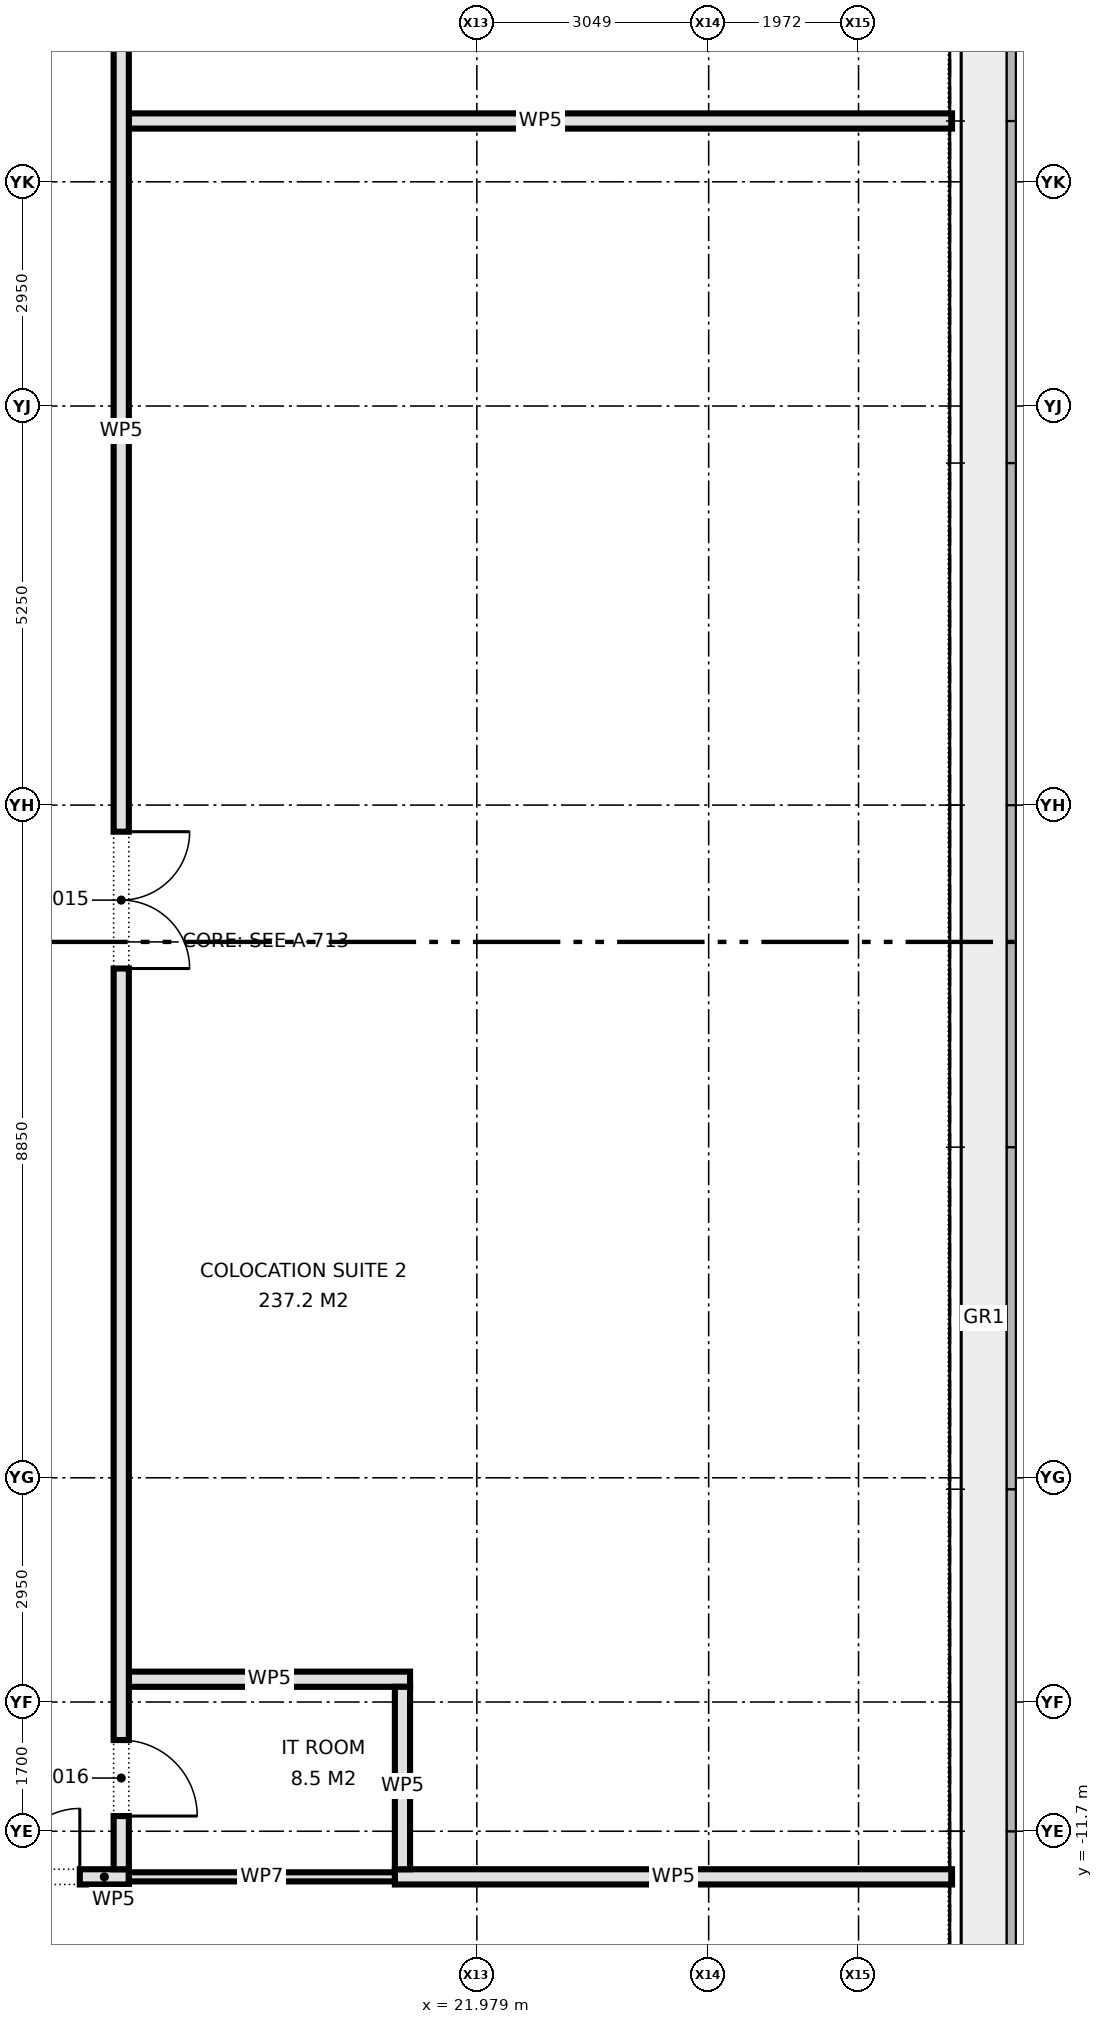
"""IFC4 building model, lengths in metres.
Left out: names, types, materials, properties, quantities, classifications, styles, units other than length and angle.
Written with IfcOpenShell. Run it as: python <this file> out.ifc"""

import sys

from ifc_helpers import new_model, si_unit, direction, frame, frame_2d, origin, place, context, subcontext, project, spatial, rectangle, extrude, element, fill, save


model = new_model("IFC4")
c1 = context("Model", 3, precision=1e-05, world=origin(), true_north=direction((0.0, 1.0)))
c2 = subcontext(c1, "Body", "Model", "MODEL_VIEW")
j1 = project(units=[si_unit("LENGTHUNIT", "METRE"), si_unit("PLANEANGLEUNIT", "RADIAN")], contexts=[c1])
p1 = place(None, origin())
s1 = spatial("IfcSite", under=j1, at=p1, CompositionType="ELEMENT")
p2 = place(p1, origin())
s2 = spatial("IfcBuilding", under=s1, at=p2, CompositionType="ELEMENT")
p3 = place(p2, frame((0.0, 0.0, 99.6)))
s3 = spatial("IfcBuildingStorey", under=s2, at=p3, CompositionType="ELEMENT", Elevation=99.6)
p4 = place(p3, frame((-20.33, -12.3, 0.0), z_axis=(0.0, 0.0, 1.0), x_axis=(1.0, 0.0, 0.0)))
e1 = element("IfcWall", 1, at=p4, inside=s3, PredefinedType="PARTITIONING", context=c2, shape_type="SweptSolid", body=[
    extrude(rectangle(XDim=37.73, YDim=0.2, at=frame_2d((18.865, 0.0))), origin(), (0.0, 0.0, 1.0), 4.2),
])
p5 = place(p4, frame((3.69, 0.0, 0.0)))
e2 = element("IfcOpeningElement", 2, at=p5, cuts=e1, PredefinedType="OPENING", context=c2, shape_type="SweptSolid", body=[
    extrude(rectangle(XDim=1.2, YDim=2.1, at=frame_2d((0.6, 1.05))), frame((0.0, 0.11, 0.0), z_axis=(0.0, -1.0, 0.0), x_axis=(1.0, 0.0, 0.0)), (0.0, 0.0, 1.0), 0.22),
])
p6 = place(p4, frame((12.13, 0.0, 0.0)))
e3 = element("IfcOpeningElement", 3, at=p6, cuts=e1, PredefinedType="OPENING", context=c2, shape_type="SweptSolid", body=[
    extrude(rectangle(XDim=1.8, YDim=2.1, at=frame_2d((0.9, 1.05))), frame((0.0, 0.11, 0.0), z_axis=(0.0, -1.0, 0.0), x_axis=(1.0, 0.0, 0.0)), (0.0, 0.0, 1.0), 0.22),
])
p7 = place(p4, frame((21.43, 0.0, 0.0)))
e4 = element("IfcOpeningElement", 4, at=p7, cuts=e1, PredefinedType="OPENING", context=c2, shape_type="SweptSolid", body=[
    extrude(rectangle(XDim=1.2, YDim=2.1, at=frame_2d((0.6, 1.05))), frame((0.0, 0.11, 0.0), z_axis=(0.0, -1.0, 0.0), x_axis=(1.0, 0.0, 0.0)), (0.0, 0.0, 1.0), 0.22),
])
p8 = place(p4, frame((35.285, 0.0, 0.0)))
e5 = element("IfcOpeningElement", 5, at=p8, cuts=e1, PredefinedType="OPENING", context=c2, shape_type="SweptSolid", body=[
    extrude(rectangle(XDim=1.8, YDim=2.1, at=frame_2d((0.9, 1.05))), frame((0.0, 0.11, 0.0), z_axis=(0.0, -1.0, 0.0), x_axis=(1.0, 0.0, 0.0)), (0.0, 0.0, 1.0), 0.22),
])
p9 = place(p4, frame((27.53, 0.0, 0.0)))
e6 = element("IfcOpeningElement", 6, at=p9, cuts=e1, PredefinedType="OPENING", context=c2, shape_type="SweptSolid", body=[
    extrude(rectangle(XDim=1.0, YDim=2.1, at=frame_2d((0.5, 1.05))), frame((0.0, 0.11, 0.0), z_axis=(0.0, -1.0, 0.0), x_axis=(1.0, 0.0, 0.0)), (0.0, 0.0, 1.0), 0.22),
])
p10 = place(p4, frame((30.53, 0.0, 0.0)))
e7 = element("IfcOpeningElement", 7, at=p10, cuts=e1, PredefinedType="OPENING", context=c2, shape_type="SweptSolid", body=[
    extrude(rectangle(XDim=1.0, YDim=2.1, at=frame_2d((0.5, 1.05))), frame((0.0, 0.11, 0.0), z_axis=(0.0, -1.0, 0.0), x_axis=(1.0, 0.0, 0.0)), (0.0, 0.0, 1.0), 0.22),
])
p11 = place(p4, frame((33.13, 0.0, 0.0)))
e8 = element("IfcOpeningElement", 8, at=p11, cuts=e1, PredefinedType="OPENING", context=c2, shape_type="SweptSolid", body=[
    extrude(rectangle(XDim=1.0, YDim=2.1, at=frame_2d((0.5, 1.05))), frame((0.0, 0.11, 0.0), z_axis=(0.0, -1.0, 0.0), x_axis=(1.0, 0.0, 0.0)), (0.0, 0.0, 1.0), 0.22),
])
p12 = place(p3, frame((20.9, -12.3, 0.0), z_axis=(0.0, 0.0, 1.0), x_axis=(1.0, 0.0, 0.0)))
e9 = element("IfcWall", 9, at=p12, inside=s3, PredefinedType="PARTITIONING", context=c2, shape_type="SweptSolid", body=[
    extrude(rectangle(XDim=7.33, YDim=0.2, at=frame_2d((3.665, 0.0))), origin(), (0.0, 0.0, 1.0), 4.2),
])
p13 = place(p3, frame((17.4, -9.7, 0.0), z_axis=(0.0, 0.0, 1.0), x_axis=(1.0, 0.0, 0.0)))
e10 = element("IfcWall", 10, at=p13, inside=s3, PredefinedType="PARTITIONING", context=c2, shape_type="SweptSolid", body=[
    extrude(rectangle(XDim=3.7, YDim=0.2, at=frame_2d((1.85, 0.0))), origin(), (0.0, 0.0, 1.0), 4.2),
])
p14 = place(p3, frame((17.4, 10.8, 0.0), z_axis=(0.0, 0.0, 1.0), x_axis=(1.0, 0.0, 0.0)))
e11 = element("IfcWall", 11, at=p14, inside=s3, PredefinedType="PARTITIONING", context=c2, shape_type="SweptSolid", body=[
    extrude(rectangle(XDim=10.83, YDim=0.2, at=frame_2d((5.415, 0.0))), origin(), (0.0, 0.0, 1.0), 4.2),
])
p15 = place(p3, frame((21.0, -12.2, 0.0), z_axis=(0.0, 0.0, 1.0), x_axis=(0.0, 1.0, 0.0)))
e12 = element("IfcWall", 12, at=p15, inside=s3, PredefinedType="PARTITIONING", context=c2, shape_type="SweptSolid", body=[
    extrude(rectangle(XDim=2.4, YDim=0.2, at=frame_2d((1.2, 0.0))), origin(), (0.0, 0.0, 1.0), 4.2),
])
p16 = place(p3, frame((17.3, -12.2, 0.0), z_axis=(0.0, 0.0, 1.0), x_axis=(0.0, 1.0, 0.0)))
e13 = element("IfcWall", 13, at=p16, inside=s3, PredefinedType="PARTITIONING", context=c2, shape_type="SweptSolid", body=[
    extrude(rectangle(XDim=24.4, YDim=0.2, at=frame_2d((12.2, 0.0))), origin(), (0.0, 0.0, 1.0), 4.2),
])
p17 = place(p16, frame((11.85, 0.0, 0.0)))
e14 = element("IfcOpeningElement", 14, at=p17, cuts=e13, PredefinedType="OPENING", context=c2, shape_type="SweptSolid", body=[
    extrude(rectangle(XDim=1.8, YDim=2.1, at=frame_2d((0.9, 1.05))), frame((0.0, 0.11, 0.0), z_axis=(0.0, -1.0, 0.0), x_axis=(1.0, 0.0, 0.0)), (0.0, 0.0, 1.0), 0.22),
])
p18 = place(p16, frame((0.7, 0.0, 0.0)))
e15 = element("IfcOpeningElement", 15, at=p18, cuts=e13, PredefinedType="OPENING", context=c2, shape_type="SweptSolid", body=[
    extrude(rectangle(XDim=1.0, YDim=2.1, at=frame_2d((0.5, 1.05))), frame((0.0, 0.11, 0.0), z_axis=(0.0, -1.0, 0.0), x_axis=(1.0, 0.0, 0.0)), (0.0, 0.0, 1.0), 0.22),
])
p19 = place(p3, frame((17.4, -12.3, 0.0), z_axis=(0.0, 0.0, 1.0), x_axis=(1.0, 0.0, 0.0)))
e16 = element("IfcWall", 16, at=p19, inside=s3, PredefinedType="PARTITIONING", context=c2, shape_type="SweptSolid", body=[
    extrude(rectangle(XDim=3.5, YDim=0.12, at=frame_2d((1.75, 0.0))), origin(), (0.0, 0.0, 1.0), 4.2),
])
p20 = place(p8, origin())
e17 = element("IfcDoor", 17, at=p20, inside=s3, OperationType="DOUBLE_DOOR_SINGLE_SWING", PredefinedType="DOOR", context=c2, shape_type="SweptSolid", body=[
    extrude(rectangle(XDim=1.8, YDim=2.1, at=frame_2d((0.9, 1.05))), frame((0.0, 0.025, 0.0), z_axis=(0.0, -1.0, 0.0), x_axis=(1.0, 0.0, 0.0)), (0.0, 0.0, 1.0), 0.05),
])
fill(e5, e17)
p21 = place(p17, frame((1.8, 0.0, 0.0), z_axis=(0.0, 0.0, 1.0), x_axis=(-1.0, 0.0, 0.0)))
e18 = element("IfcDoor", 18, at=p21, inside=s3, OperationType="DOUBLE_DOOR_SINGLE_SWING", PredefinedType="DOOR", context=c2, shape_type="SweptSolid", body=[
    extrude(rectangle(XDim=1.8, YDim=2.1, at=frame_2d((0.9, 1.05))), frame((0.0, 0.025, 0.0), z_axis=(0.0, -1.0, 0.0), x_axis=(1.0, 0.0, 0.0)), (0.0, 0.0, 1.0), 0.05),
])
fill(e14, e18)
p22 = place(p18, frame((1.0, 0.0, 0.0), z_axis=(0.0, 0.0, 1.0), x_axis=(-1.0, 0.0, 0.0)))
e19 = element("IfcDoor", 19, at=p22, inside=s3, OperationType="SINGLE_SWING_RIGHT", PredefinedType="DOOR", context=c2, shape_type="SweptSolid", body=[
    extrude(rectangle(XDim=1.0, YDim=2.1, at=frame_2d((0.5, 1.05))), frame((0.0, 0.025, 0.0), z_axis=(0.0, -1.0, 0.0), x_axis=(1.0, 0.0, 0.0)), (0.0, 0.0, 1.0), 0.05),
])
fill(e15, e19)
save(model, sys.argv[1])
